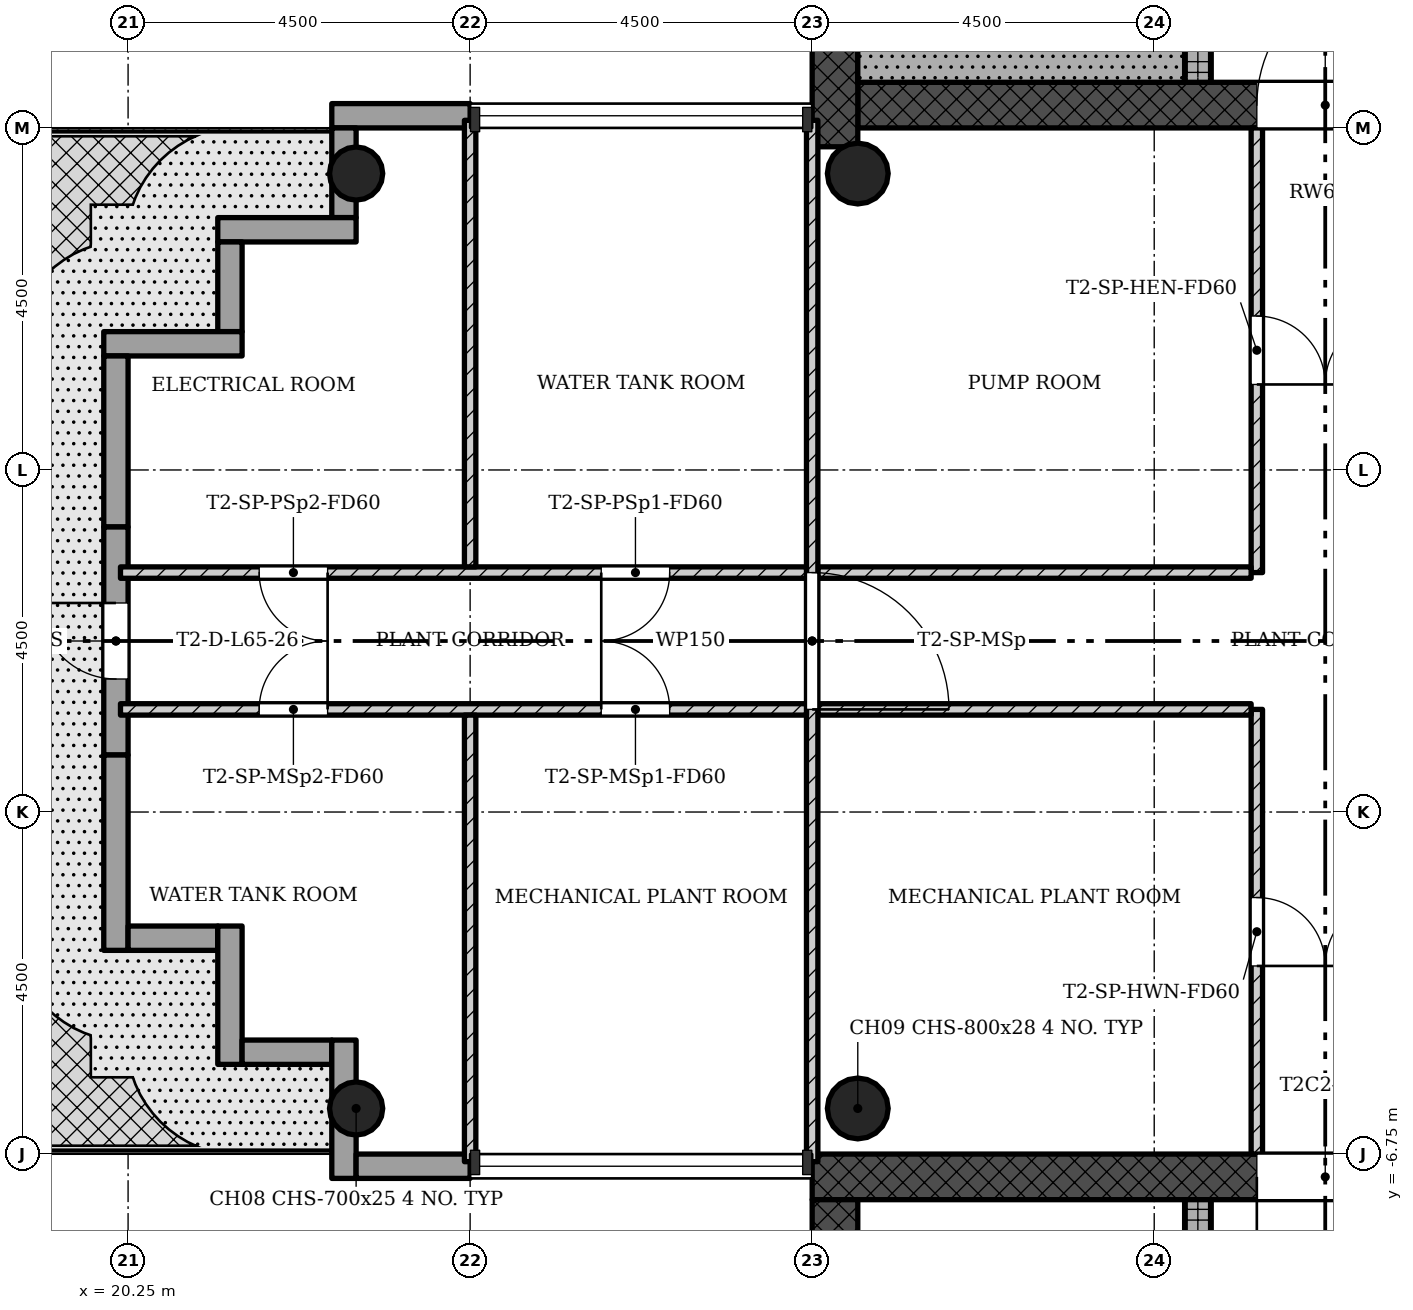
"""IFC4 building model, lengths in metres.
Left out: names, types, materials, properties, quantities, classifications, styles, units other than length and angle.
Written with IfcOpenShell. Run it as: python <this file> out.ifc"""

import sys

from ifc_helpers import new_model, si_unit, direction, frame, frame_2d, origin, origin_2d, place, context, subcontext, project, spatial, rectangle, hollow_circle, extrude, element, fill, save


model = new_model("IFC4")
c1 = context("Model", 3, precision=1e-05, world=origin(), true_north=direction((0.0, 1.0)))
c2 = subcontext(c1, "Body", "Model", "MODEL_VIEW")
j1 = project(units=[si_unit("LENGTHUNIT", "METRE"), si_unit("PLANEANGLEUNIT", "RADIAN")], contexts=[c1])
p1 = place(None, origin())
s1 = spatial("IfcSite", under=j1, at=p1, CompositionType="ELEMENT")
p2 = place(p1, origin())
s2 = spatial("IfcBuilding", under=s1, at=p2, CompositionType="ELEMENT")
p3 = place(p2, frame((0.0, 0.0, 233.4)))
s3 = spatial("IfcBuildingStorey", under=s2, at=p3, CompositionType="ELEMENT", Elevation=233.4)
p4 = place(p3, frame((29.85, 7.05, 0.0), z_axis=(0.0, 0.0, 1.0), x_axis=(1.0, 0.0, 0.0)))
e1 = element("IfcWall", 1, at=p4, inside=s3, PredefinedType="SHEAR", context=c2, shape_type="SweptSolid", body=[
    extrude(rectangle(XDim=12.9, YDim=0.6, at=frame_2d((6.45, 0.0))), origin(), (0.0, 0.0, 1.0), 4.5),
])
p5 = place(p4, frame((5.25, 0.0, 0.0)))
e2 = element("IfcOpeningElement", 2, at=p5, cuts=e1, PredefinedType="OPENING", context=c2, shape_type="SweptSolid", body=[
    extrude(rectangle(XDim=1.8, YDim=2.1, at=frame_2d((0.9, 1.05))), frame((0.0, 0.31, 0.0), z_axis=(0.0, -1.0, 0.0), x_axis=(1.0, 0.0, 0.0)), (0.0, 0.0, 1.0), 0.62),
])
p6 = place(p3, frame((29.55, 15.15, 0.0), z_axis=(0.0, 0.0, 1.0), x_axis=(0.0, -1.0, 0.0)))
e3 = element("IfcWall", 3, at=p6, inside=s3, PredefinedType="SHEAR", context=c2, shape_type="SweptSolid", body=[
    extrude(rectangle(XDim=8.648, YDim=0.6, at=frame_2d((4.324, 0.0))), origin(), (0.0, 0.0, 1.0), 4.5),
])
p7 = place(p3, frame((34.325, 7.35, 0.0), z_axis=(0.0, 0.0, 1.0), x_axis=(0.0, 1.0, 0.0)))
e4 = element("IfcWall", 4, at=p7, inside=s3, PredefinedType="SHEAR", context=c2, shape_type="SweptSolid", body=[
    extrude(rectangle(XDim=7.8, YDim=0.35, at=frame_2d((3.9, 0.0))), origin(), (0.0, 0.0, 1.0), 4.5),
])
p8 = place(p7, frame((1.05, 0.0, 0.0)))
e5 = element("IfcOpeningElement", 5, at=p8, cuts=e4, PredefinedType="OPENING", context=c2, shape_type="SweptSolid", body=[
    extrude(rectangle(XDim=0.9, YDim=2.1, at=frame_2d((0.45, 1.05))), frame((0.0, 0.185, 0.0), z_axis=(0.0, -1.0, 0.0), x_axis=(1.0, 0.0, 0.0)), (0.0, 0.0, 1.0), 0.37),
])
p9 = place(p3, frame((42.15, -7.05, 0.0), z_axis=(0.0, 0.0, 1.0), x_axis=(-1.0, 0.0, 0.0)))
e6 = element("IfcWall", 6, at=p9, inside=s3, PredefinedType="SHEAR", context=c2, shape_type="SweptSolid", body=[
    extrude(rectangle(XDim=12.9, YDim=0.6, at=frame_2d((6.45, 0.0))), origin(), (0.0, 0.0, 1.0), 4.5),
])
p10 = place(p9, frame((5.25, 0.0, 0.0)))
e7 = element("IfcOpeningElement", 7, at=p10, cuts=e6, PredefinedType="OPENING", context=c2, shape_type="SweptSolid", body=[
    extrude(rectangle(XDim=1.8, YDim=2.1, at=frame_2d((0.9, 1.05))), frame((0.0, 0.31, 0.0), z_axis=(0.0, -1.0, 0.0), x_axis=(1.0, 0.0, 0.0)), (0.0, 0.0, 1.0), 0.62),
])
p11 = place(p3, frame((29.55, -7.35, 0.0), z_axis=(0.0, 0.0, 1.0), x_axis=(0.0, -1.0, 0.0)))
e8 = element("IfcWall", 8, at=p11, inside=s3, PredefinedType="SHEAR", context=c2, shape_type="SweptSolid", body=[
    extrude(rectangle(XDim=8.4, YDim=0.6, at=frame_2d((4.2, 0.0))), origin(), (0.0, 0.0, 1.0), 4.5),
])
p12 = place(p3, frame((34.325, -15.15, 0.0), z_axis=(0.0, 0.0, 1.0), x_axis=(0.0, 1.0, 0.0)))
e9 = element("IfcWall", 9, at=p12, inside=s3, PredefinedType="SHEAR", context=c2, shape_type="SweptSolid", body=[
    extrude(rectangle(XDim=7.8, YDim=0.35, at=frame_2d((3.9, 0.0))), origin(), (0.0, 0.0, 1.0), 4.5),
])
p13 = place(p12, frame((5.55, 0.0, 0.0)))
e10 = element("IfcOpeningElement", 10, at=p13, cuts=e9, PredefinedType="OPENING", context=c2, shape_type="SweptSolid", body=[
    extrude(rectangle(XDim=1.1, YDim=2.1, at=frame_2d((0.55, 1.05))), frame((0.0, 0.185, 0.0), z_axis=(0.0, -1.0, 0.0), x_axis=(1.0, 0.0, 0.0)), (0.0, 0.0, 1.0), 0.37),
])
p14 = place(p12, frame((1.2, 0.0, 0.0)))
e11 = element("IfcOpeningElement", 11, at=p14, cuts=e9, PredefinedType="OPENING", context=c2, shape_type="SweptSolid", body=[
    extrude(rectangle(XDim=1.1, YDim=2.1, at=frame_2d((0.55, 1.05))), frame((0.0, 0.185, 0.0), z_axis=(0.0, -1.0, 0.0), x_axis=(1.0, 0.0, 0.0)), (0.0, 0.0, 1.0), 0.37),
])
p15 = place(p12, frame((3.5, 0.0, 0.0)))
e12 = element("IfcOpeningElement", 12, at=p15, cuts=e9, PredefinedType="OPENING", context=c2, shape_type="SweptSolid", body=[
    extrude(rectangle(XDim=0.9, YDim=2.1, at=frame_2d((0.45, 1.05))), frame((0.0, 0.185, 0.0), z_axis=(0.0, -1.0, 0.0), x_axis=(1.0, 0.0, 0.0)), (0.0, 0.0, 1.0), 0.37),
])
for number, where, z_axis, x_axis in (
    (13, (23.25, 6.15, 0.0), (0.0, 0.0, 1.0), (1.0, 0.0, 0.0)),
    (14, (23.25, -6.15, 0.0), (0.0, 0.0, 1.0), (1.0, 0.0, 0.0)),
):
    element("IfcColumn", number, at=place(p3, frame(where, z_axis=z_axis, x_axis=x_axis)), inside=s3, PredefinedType="COLUMN", context=c2, shape_type="SweptSolid", body=[
        extrude(hollow_circle(Radius=0.35, WallThickness=0.025, at=origin_2d()), origin(), (0.0, 0.0, 1.0), 4.5),
    ])
for number, where, z_axis, x_axis in (
    (15, (29.85, 6.15, 0.0), (0.0, 0.0, 1.0), (1.0, 0.0, 0.0)),
    (16, (29.85, -6.15, 0.0), (0.0, 0.0, 1.0), (1.0, 0.0, 0.0)),
):
    element("IfcColumn", number, at=place(p3, frame(where, z_axis=z_axis, x_axis=x_axis)), inside=s3, PredefinedType="COLUMN", context=c2, shape_type="SweptSolid", body=[
        extrude(hollow_circle(Radius=0.4, WallThickness=0.028, at=origin_2d()), origin(), (0.0, 0.0, 1.0), 4.5),
    ])
p16 = place(p3, frame((24.75, 6.91, 0.0), z_axis=(0.0, 0.0, 1.0), x_axis=(-1.0, 0.0, 0.0)))
e17 = element("IfcWall", 17, at=p16, inside=s3, PredefinedType="STANDARD", context=c2, shape_type="SweptSolid", body=[
    extrude(rectangle(XDim=1.82, YDim=0.32, at=frame_2d((0.91, 0.0))), origin(), (0.0, 0.0, 1.0), 4.2),
])
p17 = place(p3, frame((23.09, 6.75, -0.02), z_axis=(0.0, 0.0, 1.0), x_axis=(0.0, -1.0, 0.0)))
e18 = element("IfcWall", 18, at=p17, inside=s3, PredefinedType="STANDARD", context=c2, shape_type="SweptSolid", body=[
    extrude(rectangle(XDim=1.18, YDim=0.32, at=frame_2d((0.59, 0.0))), origin(), (0.0, 0.0, 1.0), 4.22),
])
p18 = place(p3, frame((23.25, 5.41, -0.02), z_axis=(0.0, 0.0, 1.0), x_axis=(-1.0, 0.0, 0.0)))
e19 = element("IfcWall", 19, at=p18, inside=s3, PredefinedType="STANDARD", context=c2, shape_type="SweptSolid", body=[
    extrude(rectangle(XDim=1.82, YDim=0.32, at=frame_2d((0.91, 0.0))), origin(), (0.0, 0.0, 1.0), 4.22),
])
p19 = place(p3, frame((21.59, 5.25, -0.02), z_axis=(0.0, 0.0, 1.0), x_axis=(0.0, -1.0, 0.0)))
e20 = element("IfcWall", 20, at=p19, inside=s3, PredefinedType="STANDARD", context=c2, shape_type="SweptSolid", body=[
    extrude(rectangle(XDim=1.18, YDim=0.32, at=frame_2d((0.59, 0.0))), origin(), (0.0, 0.0, 1.0), 4.22),
])
p20 = place(p3, frame((21.75, 3.91, -0.02), z_axis=(0.0, 0.0, 1.0), x_axis=(-1.0, 0.0, 0.0)))
e21 = element("IfcWall", 21, at=p20, inside=s3, PredefinedType="STANDARD", context=c2, shape_type="SweptSolid", body=[
    extrude(rectangle(XDim=1.82, YDim=0.32, at=frame_2d((0.91, 0.0))), origin(), (0.0, 0.0, 1.0), 4.22),
])
p21 = place(p3, frame((20.09, 3.75, -0.02), z_axis=(0.0, 0.0, 1.0), x_axis=(0.0, -1.0, 0.0)))
e22 = element("IfcWall", 22, at=p21, inside=s3, PredefinedType="STANDARD", context=c2, shape_type="SweptSolid", body=[
    extrude(rectangle(XDim=2.25, YDim=0.32, at=frame_2d((1.125, 0.0))), origin(), (0.0, 0.0, 1.0), 4.22),
])
p22 = place(p3, frame((20.09, 1.5, -0.02), z_axis=(0.0, 0.0, 1.0), x_axis=(0.0, -1.0, 0.0)))
e23 = element("IfcWall", 23, at=p22, inside=s3, PredefinedType="STANDARD", context=c2, shape_type="SweptSolid", body=[
    extrude(rectangle(XDim=3.0, YDim=0.32, at=frame_2d((1.5, 0.0))), origin(), (0.0, 0.0, 1.0), 4.22),
])
p23 = place(p22, frame((1.0, 0.0, 0.02)))
e24 = element("IfcOpeningElement", 24, at=p23, cuts=e23, PredefinedType="OPENING", context=c2, shape_type="SweptSolid", body=[
    extrude(rectangle(XDim=1.0, YDim=2.1, at=frame_2d((0.5, 1.05))), frame((0.0, 0.17, 0.0), z_axis=(0.0, -1.0, 0.0), x_axis=(1.0, 0.0, 0.0)), (0.0, 0.0, 1.0), 0.34),
])
p24 = place(p3, frame((20.09, -1.5, -0.02), z_axis=(0.0, 0.0, 1.0), x_axis=(0.0, -1.0, 0.0)))
e25 = element("IfcWall", 25, at=p24, inside=s3, PredefinedType="STANDARD", context=c2, shape_type="SweptSolid", body=[
    extrude(rectangle(XDim=2.57, YDim=0.32, at=frame_2d((1.285, 0.0))), origin(), (0.0, 0.0, 1.0), 4.22),
])
p25 = place(p3, frame((20.25, -3.91, -0.02), z_axis=(0.0, 0.0, 1.0), x_axis=(1.0, 0.0, 0.0)))
e26 = element("IfcWall", 26, at=p25, inside=s3, PredefinedType="STANDARD", context=c2, shape_type="SweptSolid", body=[
    extrude(rectangle(XDim=1.18, YDim=0.32, at=frame_2d((0.59, 0.0))), origin(), (0.0, 0.0, 1.0), 4.22),
])
p26 = place(p3, frame((21.59, -3.75, -0.02), z_axis=(0.0, 0.0, 1.0), x_axis=(0.0, -1.0, 0.0)))
e27 = element("IfcWall", 27, at=p26, inside=s3, PredefinedType="STANDARD", context=c2, shape_type="SweptSolid", body=[
    extrude(rectangle(XDim=1.82, YDim=0.32, at=frame_2d((0.91, 0.0))), origin(), (0.0, 0.0, 1.0), 4.22),
])
p27 = place(p3, frame((21.75, -5.41, -0.02), z_axis=(0.0, 0.0, 1.0), x_axis=(1.0, 0.0, 0.0)))
e28 = element("IfcWall", 28, at=p27, inside=s3, PredefinedType="STANDARD", context=c2, shape_type="SweptSolid", body=[
    extrude(rectangle(XDim=1.18, YDim=0.32, at=frame_2d((0.59, 0.0))), origin(), (0.0, 0.0, 1.0), 4.22),
])
p28 = place(p3, frame((23.09, -5.25, -0.02), z_axis=(0.0, 0.0, 1.0), x_axis=(0.0, -1.0, 0.0)))
e29 = element("IfcWall", 29, at=p28, inside=s3, PredefinedType="STANDARD", context=c2, shape_type="SweptSolid", body=[
    extrude(rectangle(XDim=1.82, YDim=0.32, at=frame_2d((0.91, 0.0))), origin(), (0.0, 0.0, 1.0), 4.22),
])
p29 = place(p3, frame((23.25, -6.91, 0.0), z_axis=(0.0, 0.0, 1.0), x_axis=(1.0, 0.0, 0.0)))
e30 = element("IfcWall", 30, at=p29, inside=s3, PredefinedType="STANDARD", context=c2, shape_type="SweptSolid", body=[
    extrude(rectangle(XDim=1.5, YDim=0.32, at=frame_2d((0.75, 0.0))), origin(), (0.0, 0.0, 1.0), 4.2),
])
p30 = place(p3, frame((35.1, 0.9, 0.0), z_axis=(0.0, 0.0, 1.0), x_axis=(0.0, 1.0, 0.0)))
e31 = element("IfcWall", 31, at=p30, inside=s3, PredefinedType="PARTITIONING", context=c2, shape_type="SweptSolid", body=[
    extrude(rectangle(XDim=5.85, YDim=0.15, at=frame_2d((2.925, 0.0))), origin(), (0.0, 0.0, 1.0), 4.1),
])
p31 = place(p30, frame((2.475, 0.0, 0.0)))
e32 = element("IfcOpeningElement", 32, at=p31, cuts=e31, PredefinedType="OPENING", context=c2, shape_type="SweptSolid", body=[
    extrude(rectangle(XDim=0.9, YDim=2.1, at=frame_2d((0.45, 1.05))), frame((0.0, 0.085, 0.0), z_axis=(0.0, -1.0, 0.0), x_axis=(1.0, 0.0, 0.0)), (0.0, 0.0, 1.0), 0.17),
])
p32 = place(p3, frame((35.025, 0.9, 0.0), z_axis=(0.0, 0.0, 1.0), x_axis=(-1.0, 0.0, 0.0)))
e33 = element("IfcWall", 33, at=p32, inside=s3, PredefinedType="PARTITIONING", context=c2, shape_type="SweptSolid", body=[
    extrude(rectangle(XDim=5.7, YDim=0.15, at=frame_2d((2.85, 0.0))), origin(), (0.0, 0.0, 1.0), 4.1),
])
p33 = place(p3, frame((35.1, -6.75, 0.0), z_axis=(0.0, 0.0, 1.0), x_axis=(0.0, 1.0, 0.0)))
e34 = element("IfcWall", 34, at=p33, inside=s3, PredefinedType="PARTITIONING", context=c2, shape_type="SweptSolid", body=[
    extrude(rectangle(XDim=5.85, YDim=0.15, at=frame_2d((2.925, 0.0))), origin(), (0.0, 0.0, 1.0), 4.1),
])
p34 = place(p33, frame((2.475, 0.0, 0.0)))
e35 = element("IfcOpeningElement", 35, at=p34, cuts=e34, PredefinedType="OPENING", context=c2, shape_type="SweptSolid", body=[
    extrude(rectangle(XDim=0.9, YDim=2.1, at=frame_2d((0.45, 1.05))), frame((0.0, 0.085, 0.0), z_axis=(0.0, -1.0, 0.0), x_axis=(1.0, 0.0, 0.0)), (0.0, 0.0, 1.0), 0.17),
])
p35 = place(p3, frame((35.025, -0.9, 0.0), z_axis=(0.0, 0.0, 1.0), x_axis=(-1.0, 0.0, 0.0)))
e36 = element("IfcWall", 36, at=p35, inside=s3, PredefinedType="PARTITIONING", context=c2, shape_type="SweptSolid", body=[
    extrude(rectangle(XDim=5.7, YDim=0.15, at=frame_2d((2.85, 0.0))), origin(), (0.0, 0.0, 1.0), 4.1),
])
p36 = place(p3, frame((29.25, -6.85, 0.0), z_axis=(0.0, 0.0, 1.0), x_axis=(0.0, 1.0, 0.0)))
e37 = element("IfcWall", 37, at=p36, inside=s3, PredefinedType="PARTITIONING", context=c2, shape_type="SweptSolid", body=[
    extrude(rectangle(XDim=13.7, YDim=0.15, at=frame_2d((6.85, 0.0))), origin(), (0.0, 0.0, 1.0), 4.1),
])
p37 = place(p36, frame((5.95, 0.0, 0.0)))
e38 = element("IfcOpeningElement", 38, at=p37, cuts=e37, PredefinedType="OPENING", context=c2, shape_type="SweptSolid", body=[
    extrude(rectangle(XDim=1.8, YDim=2.1, at=frame_2d((0.9, 1.05))), frame((0.0, 0.085, 0.0), z_axis=(0.0, -1.0, 0.0), x_axis=(1.0, 0.0, 0.0)), (0.0, 0.0, 1.0), 0.17),
])
p38 = place(p3, frame((29.175, 0.9, 0.0), z_axis=(0.0, 0.0, 1.0), x_axis=(-1.0, 0.0, 0.0)))
e39 = element("IfcWall", 39, at=p38, inside=s3, PredefinedType="PARTITIONING", context=c2, shape_type="SweptSolid", body=[
    extrude(rectangle(XDim=9.025, YDim=0.15, at=frame_2d((4.513, 0.0))), origin(), (0.0, 0.0, 1.0), 4.1),
])
p39 = place(p38, frame((1.8, 0.0, 0.0)))
e40 = element("IfcOpeningElement", 40, at=p39, cuts=e39, PredefinedType="OPENING", context=c2, shape_type="SweptSolid", body=[
    extrude(rectangle(XDim=0.9, YDim=2.1, at=frame_2d((0.45, 1.05))), frame((0.0, 0.085, 0.0), z_axis=(0.0, -1.0, 0.0), x_axis=(1.0, 0.0, 0.0)), (0.0, 0.0, 1.0), 0.17),
])
p40 = place(p38, frame((6.3, 0.0, 0.0)))
e41 = element("IfcOpeningElement", 41, at=p40, cuts=e39, PredefinedType="OPENING", context=c2, shape_type="SweptSolid", body=[
    extrude(rectangle(XDim=0.9, YDim=2.1, at=frame_2d((0.45, 1.05))), frame((0.0, 0.085, 0.0), z_axis=(0.0, -1.0, 0.0), x_axis=(1.0, 0.0, 0.0)), (0.0, 0.0, 1.0), 0.17),
])
p41 = place(p3, frame((24.75, 0.975, 0.0), z_axis=(0.0, 0.0, 1.0), x_axis=(0.0, 1.0, 0.0)))
e42 = element("IfcWall", 42, at=p41, inside=s3, PredefinedType="PARTITIONING", context=c2, shape_type="SweptSolid", body=[
    extrude(rectangle(XDim=5.875, YDim=0.15, at=frame_2d((2.938, 0.0))), origin(), (0.0, 0.0, 1.0), 4.1),
])
p42 = place(p3, frame((29.175, -0.9, 0.0), z_axis=(0.0, 0.0, 1.0), x_axis=(-1.0, 0.0, 0.0)))
e43 = element("IfcWall", 43, at=p42, inside=s3, PredefinedType="PARTITIONING", context=c2, shape_type="SweptSolid", body=[
    extrude(rectangle(XDim=9.025, YDim=0.15, at=frame_2d((4.513, 0.0))), origin(), (0.0, 0.0, 1.0), 4.1),
])
p43 = place(p42, frame((1.8, 0.0, 0.0)))
e44 = element("IfcOpeningElement", 44, at=p43, cuts=e43, PredefinedType="OPENING", context=c2, shape_type="SweptSolid", body=[
    extrude(rectangle(XDim=0.9, YDim=2.1, at=frame_2d((0.45, 1.05))), frame((0.0, 0.085, 0.0), z_axis=(0.0, -1.0, 0.0), x_axis=(1.0, 0.0, 0.0)), (0.0, 0.0, 1.0), 0.17),
])
p44 = place(p42, frame((6.3, 0.0, 0.0)))
e45 = element("IfcOpeningElement", 45, at=p44, cuts=e43, PredefinedType="OPENING", context=c2, shape_type="SweptSolid", body=[
    extrude(rectangle(XDim=0.9, YDim=2.1, at=frame_2d((0.45, 1.05))), frame((0.0, 0.085, 0.0), z_axis=(0.0, -1.0, 0.0), x_axis=(1.0, 0.0, 0.0)), (0.0, 0.0, 1.0), 0.17),
])
p45 = place(p3, frame((24.75, -0.975, 0.0), z_axis=(0.0, 0.0, 1.0), x_axis=(0.0, -1.0, 0.0)))
e46 = element("IfcWall", 46, at=p45, inside=s3, PredefinedType="PARTITIONING", context=c2, shape_type="SweptSolid", body=[
    extrude(rectangle(XDim=5.875, YDim=0.15, at=frame_2d((2.938, 0.0))), origin(), (0.0, 0.0, 1.0), 4.1),
])
p46 = place(p3, frame((34.15, 7.65, 0.0), z_axis=(0.0, 0.0, 1.0), x_axis=(-1.0, 0.0, 0.0)))
e47 = element("IfcWall", 47, at=p46, inside=s3, PredefinedType="SHEAR", context=c2, shape_type="SweptSolid", body=[
    extrude(rectangle(XDim=4.3, YDim=0.6, at=frame_2d((2.15, 0.0))), origin(), (0.0, 0.0, 1.0), 4.5),
])
p47 = place(p23, origin())
e48 = element("IfcDoor", 48, at=p47, inside=s3, OperationType="SINGLE_SWING_LEFT", PredefinedType="DOOR", context=c2, shape_type="SweptSolid", body=[
    extrude(rectangle(XDim=1.0, YDim=2.1, at=frame_2d((0.5, 1.05))), frame((0.0, 0.025, 0.0), z_axis=(0.0, -1.0, 0.0), x_axis=(1.0, 0.0, 0.0)), (0.0, 0.0, 1.0), 0.05),
])
fill(e24, e48)
p48 = place(p31, origin())
e49 = element("IfcDoor", 49, at=p48, inside=s3, OperationType="SINGLE_SWING_LEFT", PredefinedType="DOOR", context=c2, shape_type="SweptSolid", body=[
    extrude(rectangle(XDim=0.9, YDim=2.1, at=frame_2d((0.45, 1.05))), frame((0.0, 0.025, 0.0), z_axis=(0.0, -1.0, 0.0), x_axis=(1.0, 0.0, 0.0)), (0.0, 0.0, 1.0), 0.05),
])
fill(e32, e49)
p49 = place(p34, origin())
e50 = element("IfcDoor", 50, at=p49, inside=s3, OperationType="SINGLE_SWING_LEFT", PredefinedType="DOOR", context=c2, shape_type="SweptSolid", body=[
    extrude(rectangle(XDim=0.9, YDim=2.1, at=frame_2d((0.45, 1.05))), frame((0.0, 0.025, 0.0), z_axis=(0.0, -1.0, 0.0), x_axis=(1.0, 0.0, 0.0)), (0.0, 0.0, 1.0), 0.05),
])
fill(e35, e50)
p50 = place(p37, origin())
e51 = element("IfcDoor", 51, at=p50, inside=s3, OperationType="SINGLE_SWING_LEFT", PredefinedType="DOOR", context=c2, shape_type="SweptSolid", body=[
    extrude(rectangle(XDim=1.8, YDim=2.1, at=frame_2d((0.9, 1.05))), frame((0.0, 0.025, 0.0), z_axis=(0.0, -1.0, 0.0), x_axis=(1.0, 0.0, 0.0)), (0.0, 0.0, 1.0), 0.05),
])
fill(e38, e51)
p51 = place(p39, origin())
e52 = element("IfcDoor", 52, at=p51, inside=s3, OperationType="SINGLE_SWING_LEFT", PredefinedType="DOOR", context=c2, shape_type="SweptSolid", body=[
    extrude(rectangle(XDim=0.9, YDim=2.1, at=frame_2d((0.45, 1.05))), frame((0.0, 0.025, 0.0), z_axis=(0.0, -1.0, 0.0), x_axis=(1.0, 0.0, 0.0)), (0.0, 0.0, 1.0), 0.05),
])
fill(e40, e52)
p52 = place(p40, origin())
e53 = element("IfcDoor", 53, at=p52, inside=s3, OperationType="SINGLE_SWING_RIGHT", PredefinedType="DOOR", context=c2, shape_type="SweptSolid", body=[
    extrude(rectangle(XDim=0.9, YDim=2.1, at=frame_2d((0.45, 1.05))), frame((0.0, 0.025, 0.0), z_axis=(0.0, -1.0, 0.0), x_axis=(1.0, 0.0, 0.0)), (0.0, 0.0, 1.0), 0.05),
])
fill(e41, e53)
p53 = place(p43, origin())
e54 = element("IfcDoor", 54, at=p53, inside=s3, OperationType="SINGLE_SWING_RIGHT", PredefinedType="DOOR", context=c2, shape_type="SweptSolid", body=[
    extrude(rectangle(XDim=0.9, YDim=2.1, at=frame_2d((0.45, 1.05))), frame((0.0, 0.025, 0.0), z_axis=(0.0, -1.0, 0.0), x_axis=(1.0, 0.0, 0.0)), (0.0, 0.0, 1.0), 0.05),
])
fill(e44, e54)
p54 = place(p44, origin())
e55 = element("IfcDoor", 55, at=p54, inside=s3, OperationType="SINGLE_SWING_LEFT", PredefinedType="DOOR", context=c2, shape_type="SweptSolid", body=[
    extrude(rectangle(XDim=0.9, YDim=2.1, at=frame_2d((0.45, 1.05))), frame((0.0, 0.025, 0.0), z_axis=(0.0, -1.0, 0.0), x_axis=(1.0, 0.0, 0.0)), (0.0, 0.0, 1.0), 0.05),
])
fill(e45, e55)
p55 = place(p5, origin())
e56 = element("IfcDoor", 56, at=p55, inside=s3, OperationType="SINGLE_SWING_LEFT", PredefinedType="DOOR", context=c2, shape_type="SweptSolid", body=[
    extrude(rectangle(XDim=1.8, YDim=2.1, at=frame_2d((0.9, 1.05))), frame((0.0, 0.025, 0.0), z_axis=(0.0, -1.0, 0.0), x_axis=(1.0, 0.0, 0.0)), (0.0, 0.0, 1.0), 0.05),
])
fill(e2, e56)
p56 = place(p10, origin())
e57 = element("IfcDoor", 57, at=p56, inside=s3, OperationType="SINGLE_SWING_LEFT", PredefinedType="DOOR", context=c2, shape_type="SweptSolid", body=[
    extrude(rectangle(XDim=1.8, YDim=2.1, at=frame_2d((0.9, 1.05))), frame((0.0, 0.025, 0.0), z_axis=(0.0, -1.0, 0.0), x_axis=(1.0, 0.0, 0.0)), (0.0, 0.0, 1.0), 0.05),
])
fill(e7, e57)
save(model, sys.argv[1])
